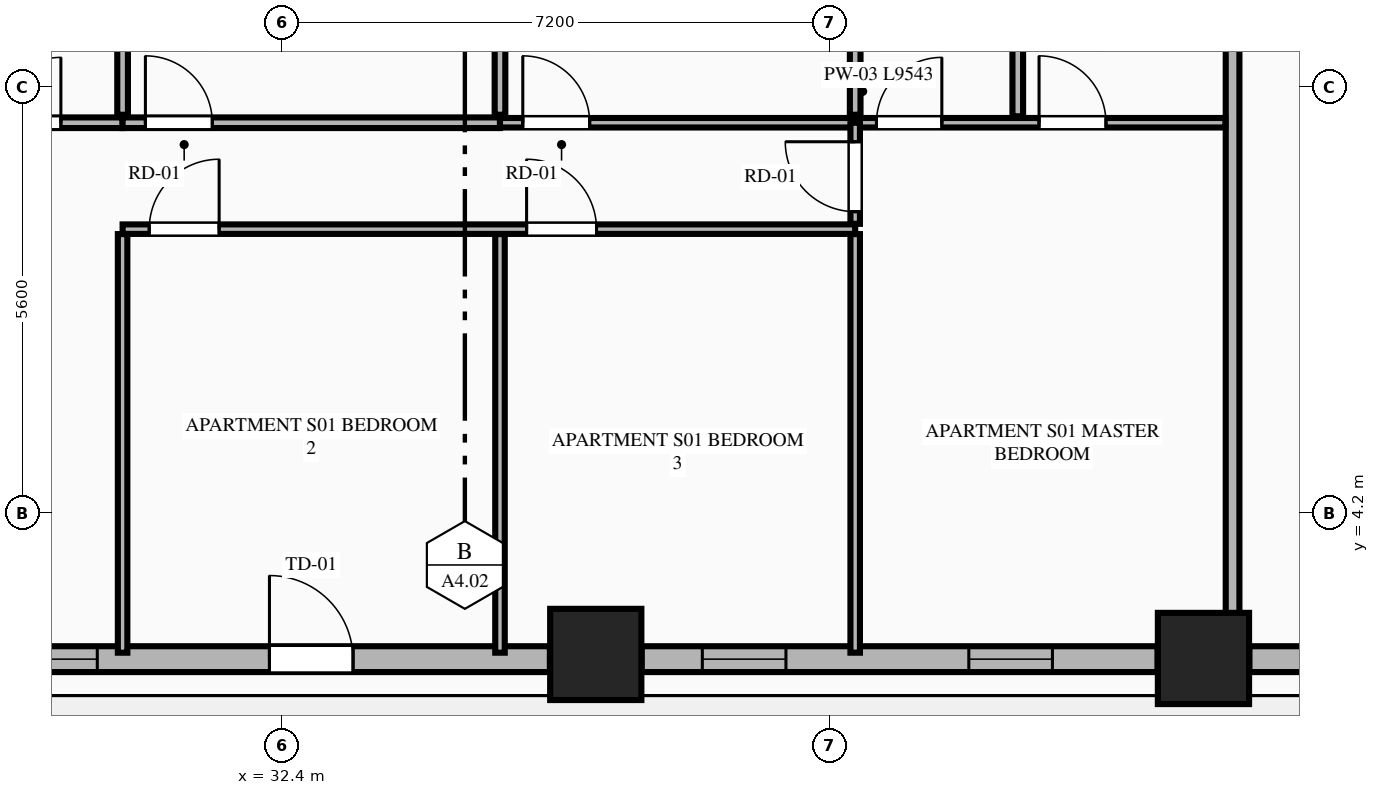
"""IFC4 building model, lengths in metres.
Left out: names, types, materials, properties, quantities, classifications, styles, units other than length and angle.
Written with IfcOpenShell. Run it as: python <this file> out.ifc"""

import sys

from ifc_helpers import new_model, si_unit, direction, frame, frame_2d, origin, origin_2d, place, context, subcontext, project, spatial, rectangle, extrude, element, fill, save


model = new_model("IFC4")
c1 = context("Model", 3, precision=1e-05, world=origin(), true_north=direction((0.0, 1.0)))
c2 = subcontext(c1, "Body", "Model", "MODEL_VIEW")
j1 = project(units=[si_unit("LENGTHUNIT", "METRE"), si_unit("PLANEANGLEUNIT", "RADIAN")], contexts=[c1])
p1 = place(None, origin())
s1 = spatial("IfcSite", under=j1, at=p1, CompositionType="ELEMENT")
p2 = place(p1, origin())
s2 = spatial("IfcBuilding", under=s1, at=p2, CompositionType="ELEMENT")
p3 = place(p2, frame((0.0, 0.0, 67.5)))
s3 = spatial("IfcBuildingStorey", under=s2, at=p3, CompositionType="ELEMENT", Elevation=67.5)
for number, where, z_axis, x_axis in (
    (1, (36.522, 2.342, 0.0), (0.0, 0.0, 1.0), (1.0, 0.0, 0.0)),
    (2, (44.517, 2.289, 0.0), (0.0, 0.0, 1.0), (1.0, 0.0, 0.0)),
):
    element("IfcColumn", number, at=place(p3, frame(where, z_axis=z_axis, x_axis=x_axis)), inside=s3, PredefinedType="COLUMN", context=c2, shape_type="SweptSolid", body=[
        extrude(rectangle(XDim=1.2, YDim=1.2, at=origin_2d()), origin(), (0.0, 0.0, 1.0), 3.55),
    ])
p4 = place(p3, frame((28.882, 2.28, 0.0), z_axis=(0.0, 0.0, 1.0), x_axis=(1.0, 0.0, 0.0)))
e3 = element("IfcWall", 3, at=p4, inside=s3, PredefinedType="STANDARD", context=c2, shape_type="SweptSolid", body=[
    extrude(rectangle(XDim=7.036, YDim=0.34, at=frame_2d((3.518, 0.0))), origin(), (0.0, 0.0, 1.0), 2.787),
])
p5 = place(p4, frame((3.347, 0.0, 0.0)))
e4 = element("IfcOpeningElement", 4, at=p5, cuts=e3, PredefinedType="OPENING", context=c2, shape_type="SweptSolid", body=[
    extrude(rectangle(XDim=1.1, YDim=2.25, at=frame_2d((0.55, 1.125))), frame((0.0, 0.18, 0.0), z_axis=(0.0, -1.0, 0.0), x_axis=(1.0, 0.0, 0.0)), (0.0, 0.0, 1.0), 0.36),
])
p6 = place(p4, frame((0.22, 0.0, 0.75)))
e5 = element("IfcOpeningElement", 5, at=p6, cuts=e3, PredefinedType="OPENING", context=c2, shape_type="SweptSolid", body=[
    extrude(rectangle(XDim=0.862, YDim=1.887, at=frame_2d((0.431, 0.943))), frame((0.0, 0.18, 0.0), z_axis=(0.0, -1.0, 0.0), x_axis=(1.0, 0.0, 0.0)), (0.0, 0.0, 1.0), 0.36),
])
p7 = place(p3, frame((37.126, 2.28, 0.0), z_axis=(0.0, 0.0, 1.0), x_axis=(1.0, 0.0, 0.0)))
e6 = element("IfcWall", 6, at=p7, inside=s3, PredefinedType="STANDARD", context=c2, shape_type="SweptSolid", body=[
    extrude(rectangle(XDim=6.787, YDim=0.34, at=frame_2d((3.394, 0.0))), origin(), (0.0, 0.0, 1.0), 2.787),
])
p8 = place(p7, frame((0.798, 0.0, 0.75)))
e7 = element("IfcOpeningElement", 7, at=p8, cuts=e6, PredefinedType="OPENING", context=c2, shape_type="SweptSolid", body=[
    extrude(rectangle(XDim=1.1, YDim=1.887, at=frame_2d((0.55, 0.943))), frame((0.0, 0.18, 0.0), z_axis=(0.0, -1.0, 0.0), x_axis=(1.0, 0.0, 0.0)), (0.0, 0.0, 1.0), 0.36),
])
p9 = place(p7, frame((4.304, 0.0, 0.75)))
e8 = element("IfcOpeningElement", 8, at=p9, cuts=e6, PredefinedType="OPENING", context=c2, shape_type="SweptSolid", body=[
    extrude(rectangle(XDim=1.1, YDim=1.887, at=frame_2d((0.55, 0.943))), frame((0.0, 0.18, 0.0), z_axis=(0.0, -1.0, 0.0), x_axis=(1.0, 0.0, 0.0)), (0.0, 0.0, 1.0), 0.36),
])
p10 = place(p3, frame((45.121, 2.28, 0.0), z_axis=(0.0, 0.0, 1.0), x_axis=(1.0, 0.0, 0.0)))
e9 = element("IfcWall", 9, at=p10, inside=s3, PredefinedType="STANDARD", context=c2, shape_type="SweptSolid", body=[
    extrude(rectangle(XDim=1.245, YDim=0.34, at=frame_2d((0.623, 0.0))), origin(), (0.0, 0.0, 1.0), 3.33),
])
p11 = place(p3, frame((44.9, 2.455, 0.0), z_axis=(0.0, 0.0, 1.0), x_axis=(0.0, 1.0, 0.0)))
e10 = element("IfcWall", 10, at=p11, inside=s3, PredefinedType="PARTITIONING", context=c2, shape_type="SweptSolid", body=[
    extrude(rectangle(XDim=13.495, YDim=0.18, at=frame_2d((6.748, 0.0))), origin(), (0.0, 0.0, 1.0), 3.33),
])
p12 = place(p3, frame((22.25, 9.337, 0.0), z_axis=(0.0, 0.0, 1.0), x_axis=(1.0, 0.0, 0.0)))
e11 = element("IfcWall", 11, at=p12, inside=s3, PredefinedType="PLUMBINGWALL", context=c2, shape_type="SweptSolid", body=[
    extrude(rectangle(XDim=8.047, YDim=0.14, at=frame_2d((4.023, 0.0))), origin(), (0.0, 0.0, 1.0), 3.33),
])
p13 = place(p12, frame((6.375, 0.0, 0.0)))
e12 = element("IfcOpeningElement", 12, at=p13, cuts=e11, PredefinedType="OPENING", context=c2, shape_type="SweptSolid", body=[
    extrude(rectangle(XDim=0.86, YDim=2.1, at=frame_2d((0.43, 1.05))), frame((0.0, 0.08, 0.0), z_axis=(0.0, -1.0, 0.0), x_axis=(1.0, 0.0, 0.0)), (0.0, 0.0, 1.0), 0.16),
])
p14 = place(p12, frame((0.26, 0.0, 0.0)))
e13 = element("IfcOpeningElement", 13, at=p14, cuts=e11, PredefinedType="OPENING", context=c2, shape_type="SweptSolid", body=[
    extrude(rectangle(XDim=0.88, YDim=2.15, at=frame_2d((0.44, 1.075))), frame((0.0, 0.08, 0.0), z_axis=(0.0, -1.0, 0.0), x_axis=(1.0, 0.0, 0.0)), (0.0, 0.0, 1.0), 0.16),
])
p15 = place(p12, frame((3.865, 0.0, 0.0)))
e14 = element("IfcOpeningElement", 14, at=p15, cuts=e11, PredefinedType="OPENING", context=c2, shape_type="SweptSolid", body=[
    extrude(rectangle(XDim=0.88, YDim=2.15, at=frame_2d((0.44, 1.075))), frame((0.0, 0.08, 0.0), z_axis=(0.0, -1.0, 0.0), x_axis=(1.0, 0.0, 0.0)), (0.0, 0.0, 1.0), 0.16),
])
p16 = place(p3, frame((30.297, 9.337, 0.0), z_axis=(0.0, 0.0, 1.0), x_axis=(1.0, 0.0, 0.0)))
e15 = element("IfcWall", 15, at=p16, inside=s3, PredefinedType="PLUMBINGWALL", context=c2, shape_type="SweptSolid", body=[
    extrude(rectangle(XDim=4.965, YDim=0.14, at=frame_2d((2.482, 0.0))), origin(), (0.0, 0.0, 1.0), 3.33),
])
p17 = place(p16, frame((0.3, 0.0, 0.0)))
e16 = element("IfcOpeningElement", 16, at=p17, cuts=e15, PredefinedType="OPENING", context=c2, shape_type="SweptSolid", body=[
    extrude(rectangle(XDim=0.88, YDim=2.15, at=frame_2d((0.44, 1.075))), frame((0.0, 0.08, 0.0), z_axis=(0.0, -1.0, 0.0), x_axis=(1.0, 0.0, 0.0)), (0.0, 0.0, 1.0), 0.16),
])
p18 = place(p3, frame((35.262, 9.337, 0.0), z_axis=(0.0, 0.0, 1.0), x_axis=(1.0, 0.0, 0.0)))
e17 = element("IfcWall", 17, at=p18, inside=s3, PredefinedType="PARTITIONING", context=c2, shape_type="SweptSolid", body=[
    extrude(rectangle(XDim=9.543, YDim=0.125, at=frame_2d((4.771, 0.0))), origin(), (0.0, 0.0, 1.0), 3.33),
])
p19 = place(p18, frame((4.953, 0.0, 0.0)))
e18 = element("IfcOpeningElement", 18, at=p19, cuts=e17, PredefinedType="OPENING", context=c2, shape_type="SweptSolid", body=[
    extrude(rectangle(XDim=0.86, YDim=2.1, at=frame_2d((0.43, 1.05))), frame((0.0, 0.073, 0.0), z_axis=(0.0, -1.0, 0.0), x_axis=(1.0, 0.0, 0.0)), (0.0, 0.0, 1.0), 0.145),
])
p20 = place(p18, frame((7.092, 0.0, 0.0)))
e19 = element("IfcOpeningElement", 19, at=p20, cuts=e17, PredefinedType="OPENING", context=c2, shape_type="SweptSolid", body=[
    extrude(rectangle(XDim=0.88, YDim=2.15, at=frame_2d((0.44, 1.075))), frame((0.0, 0.073, 0.0), z_axis=(0.0, -1.0, 0.0), x_axis=(1.0, 0.0, 0.0)), (0.0, 0.0, 1.0), 0.145),
])
p21 = place(p18, frame((0.3, 0.0, 0.0)))
e20 = element("IfcOpeningElement", 20, at=p21, cuts=e17, PredefinedType="OPENING", context=c2, shape_type="SweptSolid", body=[
    extrude(rectangle(XDim=0.88, YDim=2.15, at=frame_2d((0.44, 1.075))), frame((0.0, 0.073, 0.0), z_axis=(0.0, -1.0, 0.0), x_axis=(1.0, 0.0, 0.0)), (0.0, 0.0, 1.0), 0.145),
])
p22 = place(p3, frame((30.297, 2.365, 0.0), z_axis=(0.0, 0.0, 1.0), x_axis=(0.0, 1.0, 0.0)))
e21 = element("IfcWall", 21, at=p22, inside=s3, PredefinedType="PARTITIONING", context=c2, shape_type="SweptSolid", body=[
    extrude(rectangle(XDim=5.507, YDim=0.125, at=frame_2d((2.753, 0.0))), origin(), (0.0, 0.0, 1.0), 3.33),
])
p23 = place(p3, frame((30.297, 7.937, 0.0), z_axis=(0.0, 0.0, 1.0), x_axis=(1.0, 0.0, 0.0)))
e22 = element("IfcWall", 22, at=p23, inside=s3, PredefinedType="PARTITIONING", context=c2, shape_type="SweptSolid", body=[
    extrude(rectangle(XDim=9.638, YDim=0.125, at=frame_2d((4.819, 0.0))), origin(), (0.0, 0.0, 1.0), 3.33),
])
p24 = place(p23, frame((0.35, 0.0, 0.0)))
e23 = element("IfcOpeningElement", 23, at=p24, cuts=e22, PredefinedType="OPENING", context=c2, shape_type="SweptSolid", body=[
    extrude(rectangle(XDim=0.92, YDim=2.15, at=frame_2d((0.46, 1.075))), frame((0.0, 0.073, 0.0), z_axis=(0.0, -1.0, 0.0), x_axis=(1.0, 0.0, 0.0)), (0.0, 0.0, 1.0), 0.145),
])
p25 = place(p23, frame((5.315, 0.0, 0.0)))
e24 = element("IfcOpeningElement", 24, at=p25, cuts=e22, PredefinedType="OPENING", context=c2, shape_type="SweptSolid", body=[
    extrude(rectangle(XDim=0.92, YDim=2.15, at=frame_2d((0.46, 1.075))), frame((0.0, 0.073, 0.0), z_axis=(0.0, -1.0, 0.0), x_axis=(1.0, 0.0, 0.0)), (0.0, 0.0, 1.0), 0.145),
])
p26 = place(p3, frame((39.935, 8.007, 0.0), z_axis=(0.0, 0.0, 1.0), x_axis=(0.0, 1.0, 0.0)))
e25 = element("IfcWall", 25, at=p26, inside=s3, PredefinedType="PARTITIONING", context=c2, shape_type="SweptSolid", body=[
    extrude(rectangle(XDim=1.33, YDim=0.125, at=frame_2d((0.665, 0.0))), origin(), (0.0, 0.0, 1.0), 3.33),
])
p27 = place(p26, frame((0.16, 0.0, 0.0)))
e26 = element("IfcOpeningElement", 26, at=p27, cuts=e25, PredefinedType="OPENING", context=c2, shape_type="SweptSolid", body=[
    extrude(rectangle(XDim=0.92, YDim=2.15, at=frame_2d((0.46, 1.075))), frame((0.0, 0.073, 0.0), z_axis=(0.0, -1.0, 0.0), x_axis=(1.0, 0.0, 0.0)), (0.0, 0.0, 1.0), 0.145),
])
for number, where, z_axis, x_axis in (
    (27, (30.297, 9.442, 0.0), (0.0, 0.0, 1.0), (0.0, 1.0, 0.0)),
    (28, (35.262, 9.442, 0.0), (0.0, 0.0, 1.0), (0.0, 1.0, 0.0)),
):
    element("IfcWall", number, at=place(p3, frame(where, z_axis=z_axis, x_axis=x_axis)), inside=s3, PredefinedType="PLUMBINGWALL", context=c2, shape_type="SweptSolid", body=[
        extrude(rectangle(XDim=6.423, YDim=0.14, at=frame_2d((3.211, 0.0))), origin(), (0.0, 0.0, 1.0), 3.33),
    ])
for number, where, z_axis, x_axis in (
    (29, (35.262, 2.365, 0.0), (0.0, 0.0, 1.0), (0.0, 1.0, 0.0)),
    (30, (39.935, 2.365, 0.0), (0.0, 0.0, 1.0), (0.0, 1.0, 0.0)),
):
    element("IfcWall", number, at=place(p3, frame(where, z_axis=z_axis, x_axis=x_axis)), inside=s3, PredefinedType="PARTITIONING", context=c2, shape_type="SweptSolid", body=[
        extrude(rectangle(XDim=5.507, YDim=0.125, at=frame_2d((2.753, 0.0))), origin(), (0.0, 0.0, 1.0), 3.33),
    ])
p28 = place(p3, frame((39.935, 9.442, 0.0), z_axis=(0.0, 0.0, 1.0), x_axis=(0.0, 1.0, 0.0)))
e31 = element("IfcWall", 31, at=p28, inside=s3, PredefinedType="PLUMBINGWALL", context=c2, shape_type="SweptSolid", body=[
    extrude(rectangle(XDim=6.423, YDim=0.14, at=frame_2d((3.211, 0.0))), origin(), (0.0, 0.0, 1.0), 3.33),
])
p29 = place(p3, frame((42.074, 9.422, 0.0), z_axis=(0.0, 0.0, 1.0), x_axis=(0.0, 1.0, 0.0)))
e32 = element("IfcWall", 32, at=p29, inside=s3, PredefinedType="PLUMBINGWALL", context=c2, shape_type="SweptSolid", body=[
    extrude(rectangle(XDim=6.443, YDim=0.14, at=frame_2d((3.221, 0.0))), origin(), (0.0, 0.0, 1.0), 2.636),
])
p30 = place(p5, origin())
e33 = element("IfcDoor", 33, at=p30, inside=s3, OperationType="SINGLE_SWING_LEFT", PredefinedType="DOOR", context=c2, shape_type="SweptSolid", body=[
    extrude(rectangle(XDim=1.1, YDim=2.25, at=frame_2d((0.55, 1.125))), frame((0.0, 0.025, 0.0), z_axis=(0.0, -1.0, 0.0), x_axis=(1.0, 0.0, 0.0)), (0.0, 0.0, 1.0), 0.05),
])
fill(e4, e33)
p31 = place(p8, origin())
e34 = element("IfcWindow", 34, at=p31, inside=s3, PartitioningType="SINGLE_PANEL", PredefinedType="WINDOW", context=c2, shape_type="SweptSolid", body=[
    extrude(rectangle(XDim=1.1, YDim=1.887, at=frame_2d((0.55, 0.943))), frame((0.0, 0.03, 0.0), z_axis=(0.0, -1.0, 0.0), x_axis=(1.0, 0.0, 0.0)), (0.0, 0.0, 1.0), 0.06),
])
fill(e7, e34)
p32 = place(p13, origin())
e35 = element("IfcDoor", 35, at=p32, inside=s3, OperationType="SINGLE_SWING_RIGHT", PredefinedType="DOOR", context=c2, shape_type="SweptSolid", body=[
    extrude(rectangle(XDim=0.86, YDim=2.1, at=frame_2d((0.43, 1.05))), frame((0.0, 0.025, 0.0), z_axis=(0.0, -1.0, 0.0), x_axis=(1.0, 0.0, 0.0)), (0.0, 0.0, 1.0), 0.05),
])
fill(e12, e35)
p33 = place(p19, origin())
e36 = element("IfcDoor", 36, at=p33, inside=s3, OperationType="SINGLE_SWING_RIGHT", PredefinedType="DOOR", context=c2, shape_type="SweptSolid", body=[
    extrude(rectangle(XDim=0.86, YDim=2.1, at=frame_2d((0.43, 1.05))), frame((0.0, 0.025, 0.0), z_axis=(0.0, -1.0, 0.0), x_axis=(1.0, 0.0, 0.0)), (0.0, 0.0, 1.0), 0.05),
])
fill(e18, e36)
p34 = place(p20, origin())
e37 = element("IfcDoor", 37, at=p34, inside=s3, OperationType="SINGLE_SWING_LEFT", PredefinedType="DOOR", context=c2, shape_type="SweptSolid", body=[
    extrude(rectangle(XDim=0.88, YDim=2.15, at=frame_2d((0.44, 1.075))), frame((0.0, 0.025, 0.0), z_axis=(0.0, -1.0, 0.0), x_axis=(1.0, 0.0, 0.0)), (0.0, 0.0, 1.0), 0.05),
])
fill(e19, e37)
p35 = place(p17, origin())
e38 = element("IfcDoor", 38, at=p35, inside=s3, OperationType="SINGLE_SWING_LEFT", PredefinedType="DOOR", context=c2, shape_type="SweptSolid", body=[
    extrude(rectangle(XDim=0.88, YDim=2.15, at=frame_2d((0.44, 1.075))), frame((0.0, 0.025, 0.0), z_axis=(0.0, -1.0, 0.0), x_axis=(1.0, 0.0, 0.0)), (0.0, 0.0, 1.0), 0.05),
])
fill(e16, e38)
p36 = place(p24, origin())
e39 = element("IfcDoor", 39, at=p36, inside=s3, OperationType="SINGLE_SWING_RIGHT", PredefinedType="DOOR", context=c2, shape_type="SweptSolid", body=[
    extrude(rectangle(XDim=0.92, YDim=2.15, at=frame_2d((0.46, 1.075))), frame((0.0, 0.025, 0.0), z_axis=(0.0, -1.0, 0.0), x_axis=(1.0, 0.0, 0.0)), (0.0, 0.0, 1.0), 0.05),
])
fill(e23, e39)
p37 = place(p25, origin())
e40 = element("IfcDoor", 40, at=p37, inside=s3, OperationType="SINGLE_SWING_LEFT", PredefinedType="DOOR", context=c2, shape_type="SweptSolid", body=[
    extrude(rectangle(XDim=0.92, YDim=2.15, at=frame_2d((0.46, 1.075))), frame((0.0, 0.025, 0.0), z_axis=(0.0, -1.0, 0.0), x_axis=(1.0, 0.0, 0.0)), (0.0, 0.0, 1.0), 0.05),
])
fill(e24, e40)
p38 = place(p27, origin())
e41 = element("IfcDoor", 41, at=p38, inside=s3, OperationType="SINGLE_SWING_RIGHT", PredefinedType="DOOR", context=c2, shape_type="SweptSolid", body=[
    extrude(rectangle(XDim=0.92, YDim=2.15, at=frame_2d((0.46, 1.075))), frame((0.0, 0.025, 0.0), z_axis=(0.0, -1.0, 0.0), x_axis=(1.0, 0.0, 0.0)), (0.0, 0.0, 1.0), 0.05),
])
fill(e26, e41)
p39 = place(p21, origin())
e42 = element("IfcDoor", 42, at=p39, inside=s3, OperationType="SINGLE_SWING_LEFT", PredefinedType="DOOR", context=c2, shape_type="SweptSolid", body=[
    extrude(rectangle(XDim=0.88, YDim=2.15, at=frame_2d((0.44, 1.075))), frame((0.0, 0.025, 0.0), z_axis=(0.0, -1.0, 0.0), x_axis=(1.0, 0.0, 0.0)), (0.0, 0.0, 1.0), 0.05),
])
fill(e20, e42)
p40 = place(p6, origin())
e43 = element("IfcWindow", 43, at=p40, inside=s3, PartitioningType="SINGLE_PANEL", PredefinedType="WINDOW", context=c2, shape_type="SweptSolid", body=[
    extrude(rectangle(XDim=0.862, YDim=1.887, at=frame_2d((0.431, 0.943))), frame((0.0, 0.03, 0.0), z_axis=(0.0, -1.0, 0.0), x_axis=(1.0, 0.0, 0.0)), (0.0, 0.0, 1.0), 0.06),
])
fill(e5, e43)
p41 = place(p9, origin())
e44 = element("IfcWindow", 44, at=p41, inside=s3, PartitioningType="SINGLE_PANEL", PredefinedType="WINDOW", context=c2, shape_type="SweptSolid", body=[
    extrude(rectangle(XDim=1.1, YDim=1.887, at=frame_2d((0.55, 0.943))), frame((0.0, 0.03, 0.0), z_axis=(0.0, -1.0, 0.0), x_axis=(1.0, 0.0, 0.0)), (0.0, 0.0, 1.0), 0.06),
])
fill(e8, e44)
save(model, sys.argv[1])
